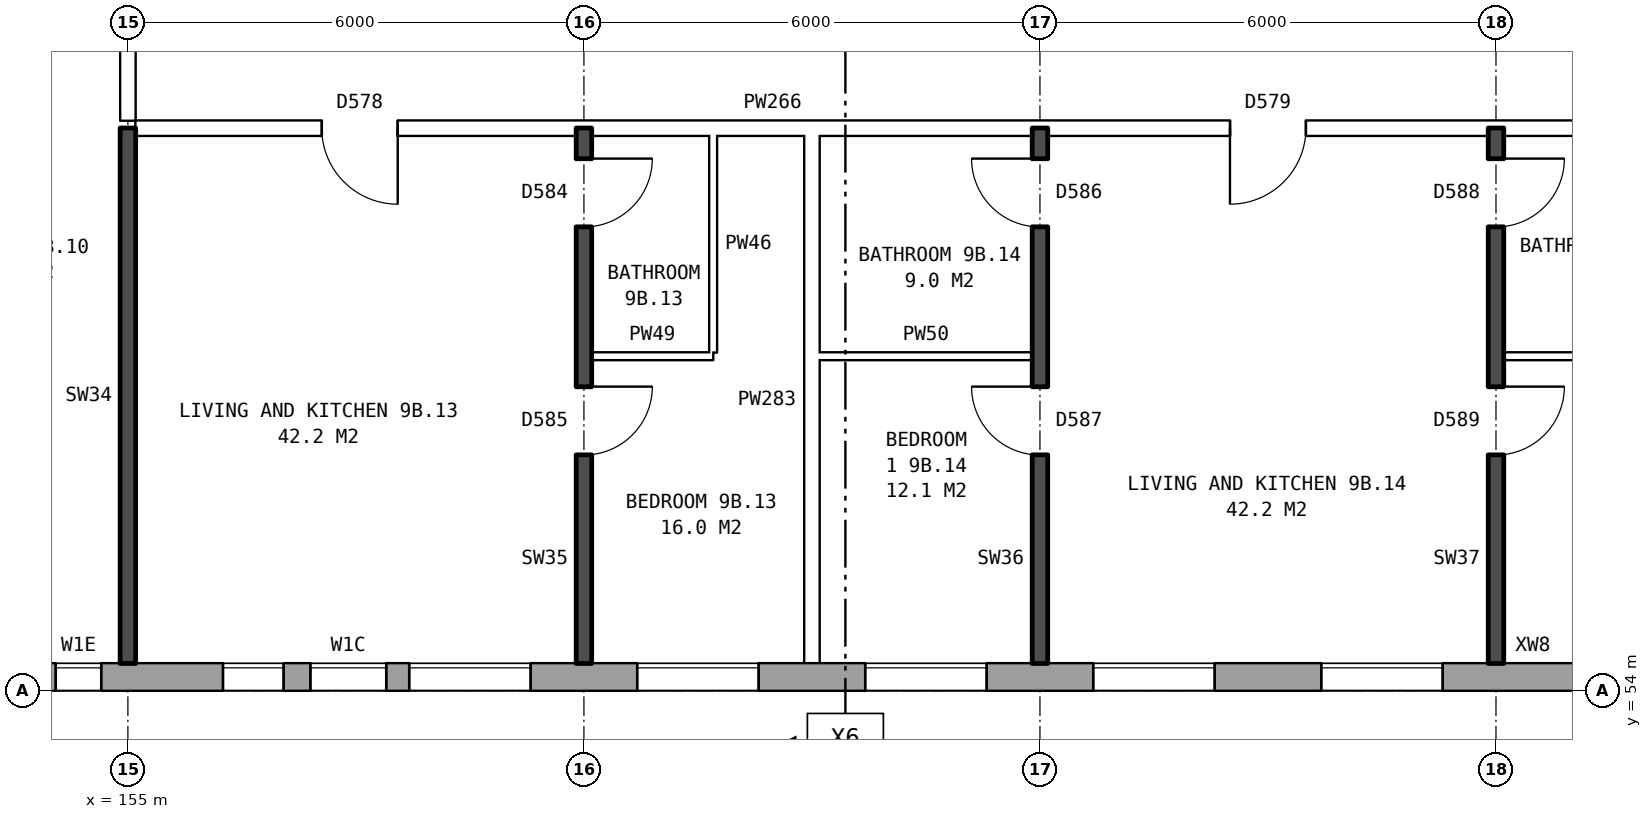
"""IFC4 building model, lengths in metres.
Left out: names, types, materials, properties, quantities, classifications, styles, units other than length and angle.
Written with IfcOpenShell. Run it as: python <this file> out.ifc"""

import sys

from ifc_helpers import new_model, si_unit, direction, frame, frame_2d, origin, place, context, subcontext, project, spatial, rectangle, extrude, element, fill, save


model = new_model("IFC4")
c1 = context("Model", 3, precision=1e-05, world=origin(), true_north=direction((0.0, 1.0)))
c2 = subcontext(c1, "Body", "Model", "MODEL_VIEW")
j1 = project(units=[si_unit("LENGTHUNIT", "METRE"), si_unit("PLANEANGLEUNIT", "RADIAN")], contexts=[c1])
p1 = place(None, origin())
s1 = spatial("IfcSite", under=j1, at=p1, CompositionType="ELEMENT")
p2 = place(p1, origin())
s2 = spatial("IfcBuilding", under=s1, at=p2, CompositionType="ELEMENT")
p3 = place(p2, frame((0.0, 0.0, 35.0)))
s3 = spatial("IfcBuildingStorey", under=s2, at=p3, CompositionType="ELEMENT", Elevation=35.0)
p4 = place(p3, frame((134.075, 54.18, 0.0), z_axis=(0.0, 0.0, 1.0), x_axis=(1.0, 0.0, 0.0)))
e1 = element("IfcWall", 1, at=p4, inside=s3, PredefinedType="STANDARD", context=c2, shape_type="SweptSolid", body=[
    extrude(rectangle(XDim=40.601, YDim=0.36, at=frame_2d((20.3, 0.0))), origin(), (0.0, 0.0, 1.0), 2.85),
])
p5 = place(p4, frame((0.625, 0.0, 0.8)))
e2 = element("IfcOpeningElement", 2, at=p5, cuts=e1, PredefinedType="OPENING", context=c2, shape_type="SweptSolid", body=[
    extrude(rectangle(XDim=1.6, YDim=1.8, at=frame_2d((0.8, 0.9))), frame((0.0, 0.19, 0.0), z_axis=(0.0, -1.0, 0.0), x_axis=(1.0, 0.0, 0.0)), (0.0, 0.0, 1.0), 0.38),
])
p6 = place(p4, frame((3.625, 0.0, 0.8)))
e3 = element("IfcOpeningElement", 3, at=p6, cuts=e1, PredefinedType="OPENING", context=c2, shape_type="SweptSolid", body=[
    extrude(rectangle(XDim=1.6, YDim=1.8, at=frame_2d((0.8, 0.9))), frame((0.0, 0.19, 0.0), z_axis=(0.0, -1.0, 0.0), x_axis=(1.0, 0.0, 0.0)), (0.0, 0.0, 1.0), 0.38),
])
p7 = place(p4, frame((6.625, 0.0, 0.8)))
e4 = element("IfcOpeningElement", 4, at=p7, cuts=e1, PredefinedType="OPENING", context=c2, shape_type="SweptSolid", body=[
    extrude(rectangle(XDim=1.6, YDim=1.8, at=frame_2d((0.8, 0.9))), frame((0.0, 0.19, 0.0), z_axis=(0.0, -1.0, 0.0), x_axis=(1.0, 0.0, 0.0)), (0.0, 0.0, 1.0), 0.38),
])
p8 = place(p4, frame((9.625, 0.0, 0.8)))
e5 = element("IfcOpeningElement", 5, at=p8, cuts=e1, PredefinedType="OPENING", context=c2, shape_type="SweptSolid", body=[
    extrude(rectangle(XDim=1.6, YDim=1.8, at=frame_2d((0.8, 0.9))), frame((0.0, 0.19, 0.0), z_axis=(0.0, -1.0, 0.0), x_axis=(1.0, 0.0, 0.0)), (0.0, 0.0, 1.0), 0.38),
])
p9 = place(p4, frame((12.625, 0.0, 0.8)))
e6 = element("IfcOpeningElement", 6, at=p9, cuts=e1, PredefinedType="OPENING", context=c2, shape_type="SweptSolid", body=[
    extrude(rectangle(XDim=1.6, YDim=1.8, at=frame_2d((0.8, 0.9))), frame((0.0, 0.19, 0.0), z_axis=(0.0, -1.0, 0.0), x_axis=(1.0, 0.0, 0.0)), (0.0, 0.0, 1.0), 0.38),
])
p10 = place(p4, frame((15.625, 0.0, 0.8)))
e7 = element("IfcOpeningElement", 7, at=p10, cuts=e1, PredefinedType="OPENING", context=c2, shape_type="SweptSolid", body=[
    extrude(rectangle(XDim=1.6, YDim=1.8, at=frame_2d((0.8, 0.9))), frame((0.0, 0.19, 0.0), z_axis=(0.0, -1.0, 0.0), x_axis=(1.0, 0.0, 0.0)), (0.0, 0.0, 1.0), 0.38),
])
p11 = place(p4, frame((18.875, 0.0, 0.15)))
e8 = element("IfcOpeningElement", 8, at=p11, cuts=e1, PredefinedType="OPENING", context=c2, shape_type="SweptSolid", body=[
    extrude(rectangle(XDim=0.8, YDim=0.9, at=frame_2d((0.4, 0.45))), frame((0.0, 0.19, 0.0), z_axis=(0.0, -1.0, 0.0), x_axis=(1.0, 0.0, 0.0)), (0.0, 0.0, 1.0), 0.38),
])
p12 = place(p4, frame((22.175, 0.0, 1.7)))
e9 = element("IfcOpeningElement", 9, at=p12, cuts=e1, PredefinedType="OPENING", context=c2, shape_type="SweptSolid", body=[
    extrude(rectangle(XDim=0.8, YDim=0.9, at=frame_2d((0.4, 0.45))), frame((0.0, 0.19, 0.0), z_axis=(0.0, -1.0, 0.0), x_axis=(1.0, 0.0, 0.0)), (0.0, 0.0, 1.0), 0.38),
])
p13 = place(p4, frame((24.625, 0.0, 0.8)))
e10 = element("IfcOpeningElement", 10, at=p13, cuts=e1, PredefinedType="OPENING", context=c2, shape_type="SweptSolid", body=[
    extrude(rectangle(XDim=1.6, YDim=1.8, at=frame_2d((0.8, 0.9))), frame((0.0, 0.19, 0.0), z_axis=(0.0, -1.0, 0.0), x_axis=(1.0, 0.0, 0.0)), (0.0, 0.0, 1.0), 0.38),
])
p14 = place(p4, frame((27.625, 0.0, 0.8)))
e11 = element("IfcOpeningElement", 11, at=p14, cuts=e1, PredefinedType="OPENING", context=c2, shape_type="SweptSolid", body=[
    extrude(rectangle(XDim=1.6, YDim=1.8, at=frame_2d((0.8, 0.9))), frame((0.0, 0.19, 0.0), z_axis=(0.0, -1.0, 0.0), x_axis=(1.0, 0.0, 0.0)), (0.0, 0.0, 1.0), 0.38),
])
p15 = place(p4, frame((30.625, 0.0, 0.8)))
e12 = element("IfcOpeningElement", 12, at=p15, cuts=e1, PredefinedType="OPENING", context=c2, shape_type="SweptSolid", body=[
    extrude(rectangle(XDim=1.6, YDim=1.8, at=frame_2d((0.8, 0.9))), frame((0.0, 0.19, 0.0), z_axis=(0.0, -1.0, 0.0), x_axis=(1.0, 0.0, 0.0)), (0.0, 0.0, 1.0), 0.38),
])
p16 = place(p4, frame((33.625, 0.0, 0.8)))
e13 = element("IfcOpeningElement", 13, at=p16, cuts=e1, PredefinedType="OPENING", context=c2, shape_type="SweptSolid", body=[
    extrude(rectangle(XDim=1.6, YDim=1.8, at=frame_2d((0.8, 0.9))), frame((0.0, 0.19, 0.0), z_axis=(0.0, -1.0, 0.0), x_axis=(1.0, 0.0, 0.0)), (0.0, 0.0, 1.0), 0.38),
])
p17 = place(p4, frame((36.625, 0.0, 0.8)))
e14 = element("IfcOpeningElement", 14, at=p17, cuts=e1, PredefinedType="OPENING", context=c2, shape_type="SweptSolid", body=[
    extrude(rectangle(XDim=1.6, YDim=1.8, at=frame_2d((0.8, 0.9))), frame((0.0, 0.19, 0.0), z_axis=(0.0, -1.0, 0.0), x_axis=(1.0, 0.0, 0.0)), (0.0, 0.0, 1.0), 0.38),
])
p18 = place(p4, frame((19.975, 0.0, 0.15)))
e15 = element("IfcOpeningElement", 15, at=p18, cuts=e1, PredefinedType="OPENING", context=c2, shape_type="SweptSolid", body=[
    extrude(rectangle(XDim=0.6, YDim=1.8, at=frame_2d((0.3, 0.9))), frame((0.0, 0.19, 0.0), z_axis=(0.0, -1.0, 0.0), x_axis=(1.0, 0.0, 0.0)), (0.0, 0.0, 1.0), 0.38),
])
p19 = place(p4, frame((23.325, 0.0, 0.8)))
e16 = element("IfcOpeningElement", 16, at=p19, cuts=e1, PredefinedType="OPENING", context=c2, shape_type="SweptSolid", body=[
    extrude(rectangle(XDim=1.0, YDim=1.8, at=frame_2d((0.5, 0.9))), frame((0.0, 0.19, 0.0), z_axis=(0.0, -1.0, 0.0), x_axis=(1.0, 0.0, 0.0)), (0.0, 0.0, 1.0), 0.38),
])
p20 = place(p3, frame((161.1, 58.4, 0.0), z_axis=(0.0, 0.0, 1.0), x_axis=(1.0, 0.0, 0.0)))
e17 = element("IfcWall", 17, at=p20, inside=s3, PredefinedType="PARTITIONING", context=c2, shape_type="SweptSolid", body=[
    extrude(rectangle(XDim=1.6, YDim=0.1, at=frame_2d((0.8, 0.0))), origin(), (0.0, 0.0, 1.0), 2.85),
])
p21 = place(p3, frame((164.1, 58.4, 0.0), z_axis=(0.0, 0.0, 1.0), x_axis=(1.0, 0.0, 0.0)))
e18 = element("IfcWall", 18, at=p21, inside=s3, PredefinedType="PARTITIONING", context=c2, shape_type="SweptSolid", body=[
    extrude(rectangle(XDim=2.8, YDim=0.1, at=frame_2d((1.4, 0.0))), origin(), (0.0, 0.0, 1.0), 2.85),
])
p22 = place(p3, frame((173.1, 58.4, 0.0), z_axis=(0.0, 0.0, 1.0), x_axis=(1.0, 0.0, 0.0)))
e19 = element("IfcWall", 19, at=p22, inside=s3, PredefinedType="PARTITIONING", context=c2, shape_type="SweptSolid", body=[
    extrude(rectangle(XDim=2.9, YDim=0.1, at=frame_2d((1.45, 0.0))), origin(), (0.0, 0.0, 1.0), 2.85),
])
p23 = place(p3, frame((155.1, 61.4, 0.0), z_axis=(0.0, 0.0, 1.0), x_axis=(1.0, 0.0, 0.0)))
e20 = element("IfcWall", 20, at=p23, inside=s3, PredefinedType="PARTITIONING", context=c2, shape_type="SweptSolid", body=[
    extrude(rectangle(XDim=22.29, YDim=0.2, at=frame_2d((11.145, 0.0))), origin(), (0.0, 0.0, 1.0), 2.85),
])
p24 = place(p23, frame((2.45, 0.0, 0.0)))
e21 = element("IfcOpeningElement", 21, at=p24, cuts=e20, PredefinedType="OPENING", context=c2, shape_type="SweptSolid", body=[
    extrude(rectangle(XDim=1.0, YDim=2.1, at=frame_2d((0.5, 1.05))), frame((0.0, 0.11, 0.0), z_axis=(0.0, -1.0, 0.0), x_axis=(1.0, 0.0, 0.0)), (0.0, 0.0, 1.0), 0.22),
])
p25 = place(p23, frame((14.4, 0.0, 0.0)))
e22 = element("IfcOpeningElement", 22, at=p25, cuts=e20, PredefinedType="OPENING", context=c2, shape_type="SweptSolid", body=[
    extrude(rectangle(XDim=1.0, YDim=2.1, at=frame_2d((0.5, 1.05))), frame((0.0, 0.11, 0.0), z_axis=(0.0, -1.0, 0.0), x_axis=(1.0, 0.0, 0.0)), (0.0, 0.0, 1.0), 0.22),
])
p26 = place(p3, frame((155.0, 54.36, 0.0), z_axis=(0.0, 0.0, 1.0), x_axis=(0.0, 1.0, 0.0)))
e23 = element("IfcWall", 23, at=p26, inside=s3, PredefinedType="SOLIDWALL", context=c2, shape_type="SweptSolid", body=[
    extrude(rectangle(XDim=7.04, YDim=0.2, at=frame_2d((3.52, 0.0))), origin(), (0.0, 0.0, 1.0), 2.85),
])
p27 = place(p3, frame((155.0, 61.5, 0.0), z_axis=(0.0, 0.0, 1.0), x_axis=(0.0, 1.0, 0.0)))
e24 = element("IfcWall", 24, at=p27, inside=s3, PredefinedType="PARTITIONING", context=c2, shape_type="SweptSolid", body=[
    extrude(rectangle(XDim=2.2, YDim=0.2, at=frame_2d((1.1, 0.0))), origin(), (0.0, 0.0, 1.0), 2.85),
])
p28 = place(p3, frame((161.0, 54.36, 0.0), z_axis=(0.0, 0.0, 1.0), x_axis=(0.0, 1.0, 0.0)))
e25 = element("IfcWall", 25, at=p28, inside=s3, PredefinedType="SOLIDWALL", context=c2, shape_type="SweptSolid", body=[
    extrude(rectangle(XDim=7.04, YDim=0.2, at=frame_2d((3.52, 0.0))), origin(), (0.0, 0.0, 1.0), 2.85),
])
p29 = place(p28, frame((2.74, 0.0, 0.0)))
e26 = element("IfcOpeningElement", 26, at=p29, cuts=e25, PredefinedType="OPENING", context=c2, shape_type="SweptSolid", body=[
    extrude(rectangle(XDim=0.9, YDim=2.1, at=frame_2d((0.45, 1.05))), frame((0.0, 0.11, 0.0), z_axis=(0.0, -1.0, 0.0), x_axis=(1.0, 0.0, 0.0)), (0.0, 0.0, 1.0), 0.22),
])
p30 = place(p28, frame((5.74, 0.0, 0.0)))
e27 = element("IfcOpeningElement", 27, at=p30, cuts=e25, PredefinedType="OPENING", context=c2, shape_type="SweptSolid", body=[
    extrude(rectangle(XDim=0.9, YDim=2.1, at=frame_2d((0.45, 1.05))), frame((0.0, 0.11, 0.0), z_axis=(0.0, -1.0, 0.0), x_axis=(1.0, 0.0, 0.0)), (0.0, 0.0, 1.0), 0.22),
])
p31 = place(p3, frame((162.7, 58.45, 0.0), z_axis=(0.0, 0.0, 1.0), x_axis=(0.0, 1.0, 0.0)))
e28 = element("IfcWall", 28, at=p31, inside=s3, PredefinedType="PARTITIONING", context=c2, shape_type="SweptSolid", body=[
    extrude(rectangle(XDim=2.85, YDim=0.1, at=frame_2d((1.425, 0.0))), origin(), (0.0, 0.0, 1.0), 2.85),
])
p32 = place(p3, frame((164.0, 54.36, 0.0), z_axis=(0.0, 0.0, 1.0), x_axis=(0.0, 1.0, 0.0)))
e29 = element("IfcWall", 29, at=p32, inside=s3, PredefinedType="PARTITIONING", context=c2, shape_type="SweptSolid", body=[
    extrude(rectangle(XDim=6.94, YDim=0.2, at=frame_2d((3.47, 0.0))), origin(), (0.0, 0.0, 1.0), 2.85),
])
p33 = place(p3, frame((167.0, 54.36, 0.0), z_axis=(0.0, 0.0, 1.0), x_axis=(0.0, 1.0, 0.0)))
e30 = element("IfcWall", 30, at=p33, inside=s3, PredefinedType="SOLIDWALL", context=c2, shape_type="SweptSolid", body=[
    extrude(rectangle(XDim=7.04, YDim=0.2, at=frame_2d((3.52, 0.0))), origin(), (0.0, 0.0, 1.0), 2.85),
])
p34 = place(p33, frame((2.74, 0.0, 0.0)))
e31 = element("IfcOpeningElement", 31, at=p34, cuts=e30, PredefinedType="OPENING", context=c2, shape_type="SweptSolid", body=[
    extrude(rectangle(XDim=0.9, YDim=2.1, at=frame_2d((0.45, 1.05))), frame((0.0, 0.11, 0.0), z_axis=(0.0, -1.0, 0.0), x_axis=(1.0, 0.0, 0.0)), (0.0, 0.0, 1.0), 0.22),
])
p35 = place(p33, frame((5.74, 0.0, 0.0)))
e32 = element("IfcOpeningElement", 32, at=p35, cuts=e30, PredefinedType="OPENING", context=c2, shape_type="SweptSolid", body=[
    extrude(rectangle(XDim=0.9, YDim=2.1, at=frame_2d((0.45, 1.05))), frame((0.0, 0.11, 0.0), z_axis=(0.0, -1.0, 0.0), x_axis=(1.0, 0.0, 0.0)), (0.0, 0.0, 1.0), 0.22),
])
p36 = place(p3, frame((173.0, 54.36, 0.0), z_axis=(0.0, 0.0, 1.0), x_axis=(0.0, 1.0, 0.0)))
e33 = element("IfcWall", 33, at=p36, inside=s3, PredefinedType="SOLIDWALL", context=c2, shape_type="SweptSolid", body=[
    extrude(rectangle(XDim=7.04, YDim=0.2, at=frame_2d((3.52, 0.0))), origin(), (0.0, 0.0, 1.0), 2.85),
])
p37 = place(p36, frame((2.74, 0.0, 0.0)))
e34 = element("IfcOpeningElement", 34, at=p37, cuts=e33, PredefinedType="OPENING", context=c2, shape_type="SweptSolid", body=[
    extrude(rectangle(XDim=0.9, YDim=2.1, at=frame_2d((0.45, 1.05))), frame((0.0, 0.11, 0.0), z_axis=(0.0, -1.0, 0.0), x_axis=(1.0, 0.0, 0.0)), (0.0, 0.0, 1.0), 0.22),
])
p38 = place(p36, frame((5.74, 0.0, 0.0)))
e35 = element("IfcOpeningElement", 35, at=p38, cuts=e33, PredefinedType="OPENING", context=c2, shape_type="SweptSolid", body=[
    extrude(rectangle(XDim=0.9, YDim=2.1, at=frame_2d((0.45, 1.05))), frame((0.0, 0.11, 0.0), z_axis=(0.0, -1.0, 0.0), x_axis=(1.0, 0.0, 0.0)), (0.0, 0.0, 1.0), 0.22),
])
p39 = place(p12, origin())
e36 = element("IfcWindow", 36, at=p39, inside=s3, PartitioningType="SINGLE_PANEL", PredefinedType="WINDOW", context=c2, shape_type="SweptSolid", body=[
    extrude(rectangle(XDim=0.8, YDim=0.9, at=frame_2d((0.4, 0.45))), frame((0.0, 0.15, 0.0), z_axis=(0.0, -1.0, 0.0), x_axis=(1.0, 0.0, 0.0)), (0.0, 0.0, 1.0), 0.06),
])
fill(e9, e36)
p40 = place(p13, origin())
e37 = element("IfcWindow", 37, at=p40, inside=s3, PartitioningType="SINGLE_PANEL", PredefinedType="WINDOW", context=c2, shape_type="SweptSolid", body=[
    extrude(rectangle(XDim=1.6, YDim=1.8, at=frame_2d((0.8, 0.9))), frame((0.0, 0.15, 0.0), z_axis=(0.0, -1.0, 0.0), x_axis=(1.0, 0.0, 0.0)), (0.0, 0.0, 1.0), 0.06),
])
fill(e10, e37)
p41 = place(p14, origin())
e38 = element("IfcWindow", 38, at=p41, inside=s3, PartitioningType="SINGLE_PANEL", PredefinedType="WINDOW", context=c2, shape_type="SweptSolid", body=[
    extrude(rectangle(XDim=1.6, YDim=1.8, at=frame_2d((0.8, 0.9))), frame((0.0, 0.15, 0.0), z_axis=(0.0, -1.0, 0.0), x_axis=(1.0, 0.0, 0.0)), (0.0, 0.0, 1.0), 0.06),
])
fill(e11, e38)
p42 = place(p15, origin())
e39 = element("IfcWindow", 39, at=p42, inside=s3, PartitioningType="SINGLE_PANEL", PredefinedType="WINDOW", context=c2, shape_type="SweptSolid", body=[
    extrude(rectangle(XDim=1.6, YDim=1.8, at=frame_2d((0.8, 0.9))), frame((0.0, 0.15, 0.0), z_axis=(0.0, -1.0, 0.0), x_axis=(1.0, 0.0, 0.0)), (0.0, 0.0, 1.0), 0.06),
])
fill(e12, e39)
p43 = place(p16, origin())
e40 = element("IfcWindow", 40, at=p43, inside=s3, PartitioningType="SINGLE_PANEL", PredefinedType="WINDOW", context=c2, shape_type="SweptSolid", body=[
    extrude(rectangle(XDim=1.6, YDim=1.8, at=frame_2d((0.8, 0.9))), frame((0.0, 0.15, 0.0), z_axis=(0.0, -1.0, 0.0), x_axis=(1.0, 0.0, 0.0)), (0.0, 0.0, 1.0), 0.06),
])
fill(e13, e40)
p44 = place(p17, origin())
e41 = element("IfcWindow", 41, at=p44, inside=s3, PartitioningType="SINGLE_PANEL", PredefinedType="WINDOW", context=c2, shape_type="SweptSolid", body=[
    extrude(rectangle(XDim=1.6, YDim=1.8, at=frame_2d((0.8, 0.9))), frame((0.0, 0.15, 0.0), z_axis=(0.0, -1.0, 0.0), x_axis=(1.0, 0.0, 0.0)), (0.0, 0.0, 1.0), 0.06),
])
fill(e14, e41)
p45 = place(p29, frame((0.9, 0.0, 0.0), z_axis=(0.0, 0.0, 1.0), x_axis=(-1.0, 0.0, 0.0)))
e42 = element("IfcDoor", 42, at=p45, inside=s3, OperationType="SINGLE_SWING_LEFT", PredefinedType="DOOR", context=c2, shape_type="SweptSolid", body=[
    extrude(rectangle(XDim=0.9, YDim=2.1, at=frame_2d((0.45, 1.05))), frame((0.0, 0.025, 0.0), z_axis=(0.0, -1.0, 0.0), x_axis=(1.0, 0.0, 0.0)), (0.0, 0.0, 1.0), 0.05),
])
fill(e26, e42)
p46 = place(p24, frame((1.0, 0.0, 0.0), z_axis=(0.0, 0.0, 1.0), x_axis=(-1.0, 0.0, 0.0)))
e43 = element("IfcDoor", 43, at=p46, inside=s3, OperationType="SINGLE_SWING_LEFT", PredefinedType="DOOR", context=c2, shape_type="SweptSolid", body=[
    extrude(rectangle(XDim=1.0, YDim=2.1, at=frame_2d((0.5, 1.05))), frame((0.0, 0.025, 0.0), z_axis=(0.0, -1.0, 0.0), x_axis=(1.0, 0.0, 0.0)), (0.0, 0.0, 1.0), 0.05),
])
fill(e21, e43)
p47 = place(p30, frame((0.9, 0.0, 0.0), z_axis=(0.0, 0.0, 1.0), x_axis=(-1.0, 0.0, 0.0)))
e44 = element("IfcDoor", 44, at=p47, inside=s3, OperationType="SINGLE_SWING_LEFT", PredefinedType="DOOR", context=c2, shape_type="SweptSolid", body=[
    extrude(rectangle(XDim=0.9, YDim=2.1, at=frame_2d((0.45, 1.05))), frame((0.0, 0.025, 0.0), z_axis=(0.0, -1.0, 0.0), x_axis=(1.0, 0.0, 0.0)), (0.0, 0.0, 1.0), 0.05),
])
fill(e27, e44)
p48 = place(p34, origin())
e45 = element("IfcDoor", 45, at=p48, inside=s3, OperationType="SINGLE_SWING_RIGHT", PredefinedType="DOOR", context=c2, shape_type="SweptSolid", body=[
    extrude(rectangle(XDim=0.9, YDim=2.1, at=frame_2d((0.45, 1.05))), frame((0.0, 0.025, 0.0), z_axis=(0.0, -1.0, 0.0), x_axis=(1.0, 0.0, 0.0)), (0.0, 0.0, 1.0), 0.05),
])
fill(e31, e45)
p49 = place(p37, frame((0.9, 0.0, 0.0), z_axis=(0.0, 0.0, 1.0), x_axis=(-1.0, 0.0, 0.0)))
e46 = element("IfcDoor", 46, at=p49, inside=s3, OperationType="SINGLE_SWING_LEFT", PredefinedType="DOOR", context=c2, shape_type="SweptSolid", body=[
    extrude(rectangle(XDim=0.9, YDim=2.1, at=frame_2d((0.45, 1.05))), frame((0.0, 0.025, 0.0), z_axis=(0.0, -1.0, 0.0), x_axis=(1.0, 0.0, 0.0)), (0.0, 0.0, 1.0), 0.05),
])
fill(e34, e46)
p50 = place(p25, frame((1.0, 0.0, 0.0), z_axis=(0.0, 0.0, 1.0), x_axis=(-1.0, 0.0, 0.0)))
e47 = element("IfcDoor", 47, at=p50, inside=s3, OperationType="SINGLE_SWING_RIGHT", PredefinedType="DOOR", context=c2, shape_type="SweptSolid", body=[
    extrude(rectangle(XDim=1.0, YDim=2.1, at=frame_2d((0.5, 1.05))), frame((0.0, 0.025, 0.0), z_axis=(0.0, -1.0, 0.0), x_axis=(1.0, 0.0, 0.0)), (0.0, 0.0, 1.0), 0.05),
])
fill(e22, e47)
p51 = place(p35, origin())
e48 = element("IfcDoor", 48, at=p51, inside=s3, OperationType="SINGLE_SWING_RIGHT", PredefinedType="DOOR", context=c2, shape_type="SweptSolid", body=[
    extrude(rectangle(XDim=0.9, YDim=2.1, at=frame_2d((0.45, 1.05))), frame((0.0, 0.025, 0.0), z_axis=(0.0, -1.0, 0.0), x_axis=(1.0, 0.0, 0.0)), (0.0, 0.0, 1.0), 0.05),
])
fill(e32, e48)
p52 = place(p38, frame((0.9, 0.0, 0.0), z_axis=(0.0, 0.0, 1.0), x_axis=(-1.0, 0.0, 0.0)))
e49 = element("IfcDoor", 49, at=p52, inside=s3, OperationType="SINGLE_SWING_LEFT", PredefinedType="DOOR", context=c2, shape_type="SweptSolid", body=[
    extrude(rectangle(XDim=0.9, YDim=2.1, at=frame_2d((0.45, 1.05))), frame((0.0, 0.025, 0.0), z_axis=(0.0, -1.0, 0.0), x_axis=(1.0, 0.0, 0.0)), (0.0, 0.0, 1.0), 0.05),
])
fill(e35, e49)
p53 = place(p18, origin())
e50 = element("IfcWindow", 50, at=p53, inside=s3, PartitioningType="SINGLE_PANEL", PredefinedType="WINDOW", context=c2, shape_type="SweptSolid", body=[
    extrude(rectangle(XDim=0.6, YDim=1.8, at=frame_2d((0.3, 0.9))), frame((0.0, 0.15, 0.0), z_axis=(0.0, -1.0, 0.0), x_axis=(1.0, 0.0, 0.0)), (0.0, 0.0, 1.0), 0.06),
])
fill(e15, e50)
p54 = place(p19, origin())
e51 = element("IfcWindow", 51, at=p54, inside=s3, PartitioningType="SINGLE_PANEL", PredefinedType="WINDOW", context=c2, shape_type="SweptSolid", body=[
    extrude(rectangle(XDim=1.0, YDim=1.8, at=frame_2d((0.5, 0.9))), frame((0.0, 0.15, 0.0), z_axis=(0.0, -1.0, 0.0), x_axis=(1.0, 0.0, 0.0)), (0.0, 0.0, 1.0), 0.06),
])
fill(e16, e51)
save(model, sys.argv[1])
